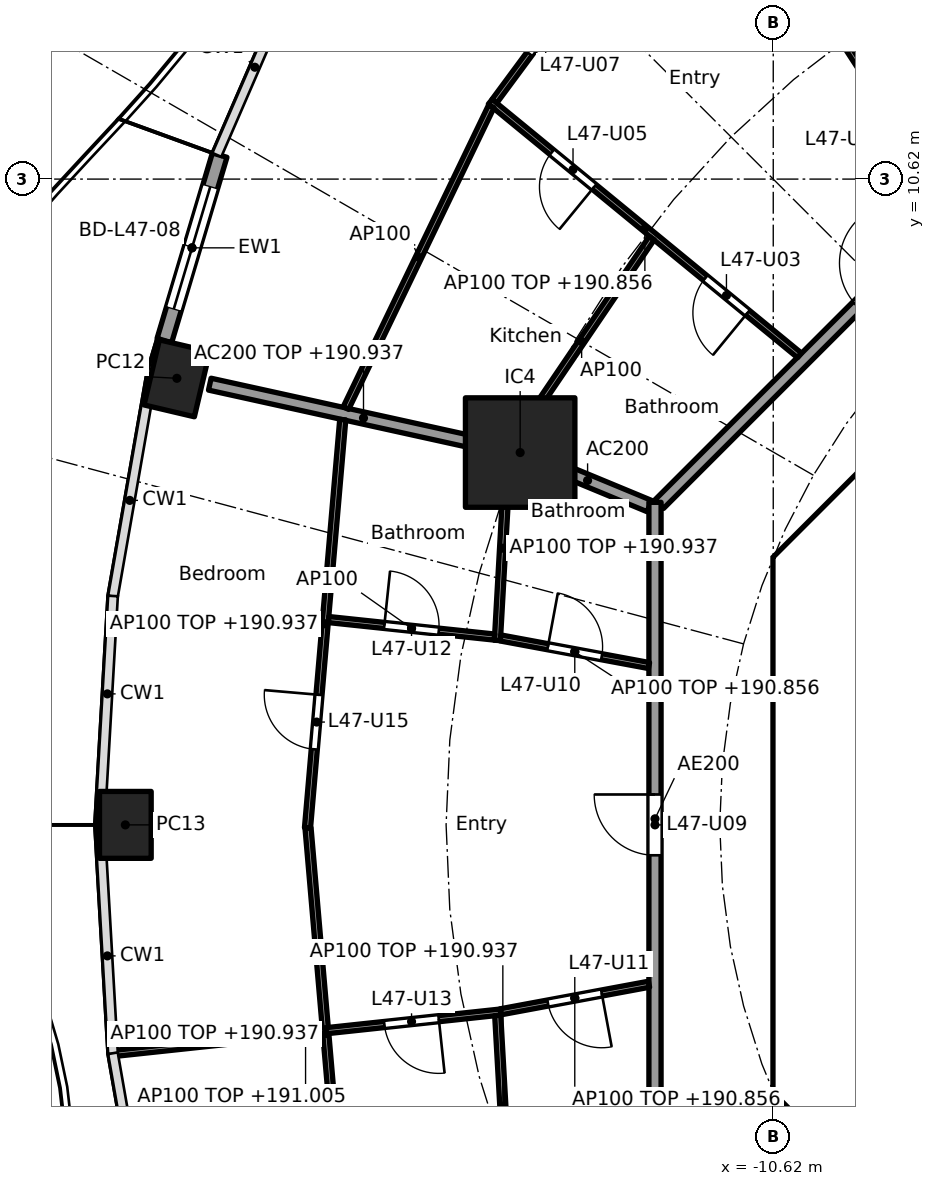
"""IFC4 building model, lengths in metres.
Left out: names, types, materials, properties, quantities, classifications, styles, units other than length and angle.
Written with IfcOpenShell. Run it as: python <this file> out.ifc"""

import sys

from ifc_helpers import new_model, si_unit, direction, frame, frame_2d, origin, origin_2d, place, context, subcontext, project, spatial, polyline, rectangle, hollow_rectangle, outline, extrude, element, fill, save


model = new_model("IFC4")
c1 = context("Model", 3, precision=1e-05, world=origin(), true_north=direction((0.0, 1.0)))
c2 = subcontext(c1, "Body", "Model", "MODEL_VIEW")
j1 = project(units=[si_unit("LENGTHUNIT", "METRE"), si_unit("PLANEANGLEUNIT", "RADIAN")], contexts=[c1])
p1 = place(None, origin())
s1 = spatial("IfcSite", under=j1, at=p1, CompositionType="ELEMENT")
p2 = place(p1, origin())
s2 = spatial("IfcBuilding", under=s1, at=p2, CompositionType="ELEMENT")
p3 = place(p2, frame((0.0, 0.0, 188.1)))
s3 = spatial("IfcBuildingStorey", under=s2, at=p3, CompositionType="ELEMENT", Elevation=188.1)
for number, where, z_axis, x_axis in (
    (1, (-20.427, 7.344, 0.0), (0.0, 0.0, 1.0), (-0.229, -0.973, 0.0)),
    (2, (-21.275, 0.0, 0.0), (0.0, 0.0, 1.0), (0.0, -1.0, 0.0)),
):
    element("IfcColumn", number, at=place(p3, frame(where, z_axis=z_axis, x_axis=x_axis)), inside=s3, PredefinedType="COLUMN", context=c2, shape_type="SweptSolid", body=[
        extrude(hollow_rectangle(XDim=1.1, YDim=0.85, WallThickness=0.036, at=origin_2d()), origin(), (0.0, 0.0, 1.0), 3.7),
    ])
p4 = place(p3, frame((-14.782, 6.123, 0.0), z_axis=(0.0, 0.0, 1.0), x_axis=(1.0, 0.0, 0.0)))
e3 = element("IfcColumn", 3, at=p4, inside=s3, PredefinedType="COLUMN", context=c2, shape_type="SweptSolid", body=[
    extrude(rectangle(XDim=1.8, YDim=1.8, at=origin_2d()), origin(), (0.0, 0.0, 1.0), 3.7),
])
p5 = place(p3, frame((-20.633, 7.965, 0.0), z_axis=(0.0, 0.0, 1.0), x_axis=(0.28584838049, 0.958274857946, 0.0)))
e4 = element("IfcWall", 4, at=p5, inside=s3, PredefinedType="SOLIDWALL", context=c2, shape_type="SweptSolid", body=[
    extrude(rectangle(XDim=3.182, YDim=0.25, at=frame_2d((1.591, 0.0))), origin(), (0.0, 0.0, 1.0), 3.44),
])
p6 = place(p5, frame((0.541, 0.0, 0.0)))
e5 = element("IfcOpeningElement", 5, at=p6, cuts=e4, PredefinedType="OPENING", context=c2, shape_type="SweptSolid", body=[
    extrude(rectangle(XDim=2.1, YDim=2.4, at=frame_2d((1.05, 1.2))), frame((0.0, 0.135, 0.0), z_axis=(0.0, -1.0, 0.0), x_axis=(1.0, 0.0, 0.0)), (0.0, 0.0, 1.0), 0.27),
])
p7 = place(p3, frame((-4.613, 9.988, 0.0), z_axis=(0.0, 0.0, 1.0), x_axis=(-0.707106781187, -0.707106781187, 0.0)))
e6 = element("IfcWall", 6, at=p7, inside=s3, PredefinedType="SHEAR", context=c2, shape_type="SweptSolid", body=[
    extrude(rectangle(XDim=7.602, YDim=0.6, at=frame_2d((3.801, 0.0))), origin(), (0.0, 0.0, 1.0), 3.44),
])
p8 = place(p7, frame((0.351, 0.0, 0.0)))
e7 = element("IfcOpeningElement", 7, at=p8, cuts=e6, PredefinedType="OPENING", context=c2, shape_type="SweptSolid", body=[
    extrude(rectangle(XDim=1.1, YDim=2.1, at=frame_2d((0.55, 1.05))), frame((0.0, 0.31, 0.0), z_axis=(0.0, -1.0, 0.0), x_axis=(1.0, 0.0, 0.0)), (0.0, 0.0, 1.0), 0.62),
])
p9 = place(p3, frame((-10.325, 3.801, 0.0), z_axis=(0.0, 0.0, 1.0), x_axis=(0.0, -1.0, 0.0)))
e8 = element("IfcWall", 8, at=p9, inside=s3, PredefinedType="SHEAR", context=c2, shape_type="SweptSolid", body=[
    extrude(rectangle(XDim=7.602, YDim=0.6, at=frame_2d((3.801, 0.0))), origin(), (0.0, 0.0, 1.0), 3.44),
])
p10 = place(p9, frame((0.651, 0.0, 0.0)))
e9 = element("IfcOpeningElement", 9, at=p10, cuts=e8, PredefinedType="OPENING", context=c2, shape_type="SweptSolid", body=[
    extrude(rectangle(XDim=1.5, YDim=2.1, at=frame_2d((0.75, 1.05))), frame((0.0, 0.31, 0.0), z_axis=(0.0, -1.0, 0.0), x_axis=(1.0, 0.0, 0.0)), (0.0, 0.0, 1.0), 0.62),
])
p11 = place(p9, frame((5.451, 0.0, 0.0)))
e10 = element("IfcOpeningElement", 10, at=p11, cuts=e8, PredefinedType="OPENING", context=c2, shape_type="SweptSolid", body=[
    extrude(rectangle(XDim=1.5, YDim=2.1, at=frame_2d((0.75, 1.05))), frame((0.0, 0.31, 0.0), z_axis=(0.0, -1.0, 0.0), x_axis=(1.0, 0.0, 0.0)), (0.0, 0.0, 1.0), 0.62),
])
p12 = place(p3, frame((-9.988, -4.613, 0.0), z_axis=(0.0, 0.0, 1.0), x_axis=(0.707106781187, -0.707106781187, 0.0)))
e11 = element("IfcWall", 11, at=p12, inside=s3, PredefinedType="SHEAR", context=c2, shape_type="SweptSolid", body=[
    extrude(rectangle(XDim=7.602, YDim=0.6, at=frame_2d((3.801, 0.0))), origin(), (0.0, 0.0, 1.0), 3.44),
])
p13 = place(p12, frame((6.151, 0.0, 0.0)))
e12 = element("IfcOpeningElement", 12, at=p13, cuts=e11, PredefinedType="OPENING", context=c2, shape_type="SweptSolid", body=[
    extrude(rectangle(XDim=1.1, YDim=2.1, at=frame_2d((0.55, 1.05))), frame((0.0, 0.31, 0.0), z_axis=(0.0, -1.0, 0.0), x_axis=(1.0, 0.0, 0.0)), (0.0, 0.0, 1.0), 0.62),
])
p14 = place(p3, origin())
e13 = element("IfcWall", 13, at=p14, inside=s3, PredefinedType="SHEAR", context=c2, shape_type="SweptSolid", body=[
    extrude(outline(polyline([(-10.625, -3.801), (-10.025, -3.801), (-10.025, -4.152), (-9.776, -4.401), (-10.2, -4.825), (-10.625, -4.401), (-10.625, -3.801)])), origin(), (0.0, 0.0, 1.0), 3.44),
])
p15 = place(p3, origin())
e14 = element("IfcWall", 14, at=p15, inside=s3, PredefinedType="SHEAR", context=c2, shape_type="SweptSolid", body=[
    extrude(outline(polyline([(-10.2, 4.825), (-9.776, 4.401), (-10.025, 4.152), (-10.025, 3.801), (-10.625, 3.801), (-10.625, 4.401), (-10.2, 4.825)])), origin(), (0.0, 0.0, 1.0), 3.44),
])
for number, where, z_axis, x_axis in (
    (15, (-10.025, -4.0, 0.0), (0.0, 0.0, 1.0), (1.0, 0.0, 0.0)),
    (16, (-10.025, 4.0, 0.0), (0.0, 0.0, 1.0), (1.0, 0.0, 0.0)),
):
    element("IfcWall", number, at=place(p3, frame(where, z_axis=z_axis, x_axis=x_axis)), inside=s3, PredefinedType="PARTITIONING", context=c2, shape_type="SweptSolid", body=[
        extrude(rectangle(XDim=3.325, YDim=0.2, at=frame_2d((1.662, 0.0))), origin(), (0.0, 0.0, 1.0), 3.44),
    ])
p16 = place(p3, frame((-12.657, 5.243, 0.0), z_axis=(0.0, 0.0, 1.0), x_axis=(-0.923859888513, 0.38273085373, 0.0)))
e17 = element("IfcWall", 17, at=p16, inside=s3, PredefinedType="PARTITIONING", context=c2, shape_type="SweptSolid", body=[
    extrude(rectangle(XDim=2.199, YDim=0.2, at=frame_2d((1.1, 0.0))), origin(), (0.0, 0.0, 1.0), 3.44),
])
p17 = place(p3, frame((-14.831, 6.134, 0.0), z_axis=(0.0, 0.0, 1.0), x_axis=(-0.976568396888, 0.215207263354, 0.0)))
e18 = element("IfcWall", 18, at=p17, inside=s3, PredefinedType="PARTITIONING", context=c2, shape_type="SweptSolid", body=[
    extrude(rectangle(XDim=5.177, YDim=0.2, at=frame_2d((2.588, 0.0))), origin(), (0.0, 0.0, 1.0), 2.837),
])
p18 = place(p3, frame((-5.275, 12.494, 0.0), z_axis=(0.0, 0.0, 1.0), x_axis=(-0.707106781187, -0.707106781187, 0.0)))
e19 = element("IfcWall", 19, at=p18, inside=s3, PredefinedType="PARTITIONING", context=c2, shape_type="SweptSolid", body=[
    extrude(rectangle(XDim=10.209, YDim=0.2, at=frame_2d((5.104, 0.0))), origin(), (0.0, 0.0, 1.0), 3.44),
])
p19 = place(p18, frame((4.604, 0.0, 0.0)))
e20 = element("IfcOpeningElement", 20, at=p19, cuts=e19, PredefinedType="OPENING", context=c2, shape_type="SweptSolid", body=[
    extrude(rectangle(XDim=1.0, YDim=2.1, at=frame_2d((0.5, 1.05))), frame((0.0, 0.11, 0.0), z_axis=(0.0, -1.0, 0.0), x_axis=(1.0, 0.0, 0.0)), (0.0, 0.0, 1.0), 0.22),
])
p20 = place(p3, frame((-12.565, 5.304, 0.0), z_axis=(0.0, 0.0, 1.0), x_axis=(0.0, -1.0, 0.0)))
e21 = element("IfcWall", 21, at=p20, inside=s3, PredefinedType="PARTITIONING", context=c2, shape_type="SweptSolid", body=[
    extrude(rectangle(XDim=10.409, YDim=0.2, at=frame_2d((5.205, 0.0))), origin(), (0.0, 0.0, 1.0), 3.44),
])
p21 = place(p20, frame((4.804, 0.0, 0.0)))
e22 = element("IfcOpeningElement", 22, at=p21, cuts=e21, PredefinedType="OPENING", context=c2, shape_type="SweptSolid", body=[
    extrude(rectangle(XDim=1.0, YDim=2.1, at=frame_2d((0.5, 1.05))), frame((0.0, 0.11, 0.0), z_axis=(0.0, -1.0, 0.0), x_axis=(1.0, 0.0, 0.0)), (0.0, 0.0, 1.0), 0.22),
])
p22 = place(p3, frame((-7.712, 10.195, 0.0), z_axis=(0.0, 0.0, 1.0), x_axis=(-0.544179442551, 0.838968851809, 0.0)))
e23 = element("IfcWall", 23, at=p22, inside=s3, PredefinedType="PARTITIONING", context=c2, shape_type="SweptSolid", body=[
    extrude(rectangle(XDim=7.566, YDim=0.1, at=frame_2d((3.783, 0.0))), origin(), (0.0, 0.0, 1.0), 2.756),
])
p23 = place(p22, frame((1.343, 0.0, 0.0)))
e24 = element("IfcOpeningElement", 24, at=p23, cuts=e23, PredefinedType="OPENING", context=c2, shape_type="SweptSolid", body=[
    extrude(rectangle(XDim=0.9, YDim=2.1, at=frame_2d((0.45, 1.05))), frame((0.0, 0.06, 0.0), z_axis=(0.0, -1.0, 0.0), x_axis=(1.0, 0.0, 0.0)), (0.0, 0.0, 1.0), 0.12),
])
p24 = place(p22, frame((5.101, 0.0, 0.0)))
e25 = element("IfcOpeningElement", 25, at=p24, cuts=e23, PredefinedType="OPENING", context=c2, shape_type="SweptSolid", body=[
    extrude(rectangle(XDim=0.9, YDim=2.1, at=frame_2d((0.45, 1.05))), frame((0.0, 0.06, 0.0), z_axis=(0.0, -1.0, 0.0), x_axis=(1.0, 0.0, 0.0)), (0.0, 0.0, 1.0), 0.12),
])
p25 = place(p3, frame((-11.832, 16.461, 0.0), z_axis=(0.0, 0.0, 1.0), x_axis=(-0.594704483906, -0.803944386647, 0.0)))
e26 = element("IfcWall", 26, at=p25, inside=s3, PredefinedType="PARTITIONING", context=c2, shape_type="SweptSolid", body=[
    extrude(rectangle(XDim=5.672, YDim=0.1, at=frame_2d((2.836, 0.0))), origin(), (0.0, 0.0, 1.0), 2.837),
])
p26 = place(p25, frame((0.968, 0.0, 0.0)))
e27 = element("IfcOpeningElement", 27, at=p26, cuts=e26, PredefinedType="OPENING", context=c2, shape_type="SweptSolid", body=[
    extrude(rectangle(XDim=0.9, YDim=2.1, at=frame_2d((0.45, 1.05))), frame((0.0, 0.06, 0.0), z_axis=(0.0, -1.0, 0.0), x_axis=(1.0, 0.0, 0.0)), (0.0, 0.0, 1.0), 0.12),
])
p27 = place(p25, frame((3.804, 0.0, 0.0)))
e28 = element("IfcOpeningElement", 28, at=p27, cuts=e26, PredefinedType="OPENING", context=c2, shape_type="SweptSolid", body=[
    extrude(rectangle(XDim=0.9, YDim=2.1, at=frame_2d((0.45, 1.05))), frame((0.0, 0.06, 0.0), z_axis=(0.0, -1.0, 0.0), x_axis=(1.0, 0.0, 0.0)), (0.0, 0.0, 1.0), 0.12),
])
p28 = place(p3, frame((-10.189, 7.721, 0.0), z_axis=(0.0, 0.0, 1.0), x_axis=(-0.773121441079, 0.634258021112, 0.0)))
e29 = element("IfcWall", 29, at=p28, inside=s3, PredefinedType="PARTITIONING", context=c2, shape_type="SweptSolid", body=[
    extrude(rectangle(XDim=6.577, YDim=0.1, at=frame_2d((3.289, 0.0))), origin(), (0.0, 0.0, 1.0), 2.756),
])
p29 = place(p28, frame((1.104, 0.0, 0.0)))
e30 = element("IfcOpeningElement", 30, at=p29, cuts=e29, PredefinedType="OPENING", context=c2, shape_type="SweptSolid", body=[
    extrude(rectangle(XDim=0.9, YDim=2.1, at=frame_2d((0.45, 1.05))), frame((0.0, 0.06, 0.0), z_axis=(0.0, -1.0, 0.0), x_axis=(1.0, 0.0, 0.0)), (0.0, 0.0, 1.0), 0.12),
])
p30 = place(p28, frame((4.367, 0.0, 0.0)))
e31 = element("IfcOpeningElement", 31, at=p30, cuts=e29, PredefinedType="OPENING", context=c2, shape_type="SweptSolid", body=[
    extrude(rectangle(XDim=0.9, YDim=2.1, at=frame_2d((0.45, 1.05))), frame((0.0, 0.06, 0.0), z_axis=(0.0, -1.0, 0.0), x_axis=(1.0, 0.0, 0.0)), (0.0, 0.0, 1.0), 0.12),
])
p31 = place(p3, frame((-12.619, 9.65, 0.0), z_axis=(0.0, 0.0, 1.0), x_axis=(-0.561046521684, -0.82778427172, 0.0)))
e32 = element("IfcWall", 32, at=p31, inside=s3, PredefinedType="PARTITIONING", context=c2, shape_type="SweptSolid", body=[
    extrude(rectangle(XDim=4.109, YDim=0.1, at=frame_2d((2.054, 0.0))), origin(), (0.0, 0.0, 1.0), 3.44),
])
p32 = place(p3, frame((-15.257, 11.816, 0.0), z_axis=(0.0, 0.0, 1.0), x_axis=(-0.434027506504, -0.900899619046, 0.0)))
e33 = element("IfcWall", 33, at=p32, inside=s3, PredefinedType="PARTITIONING", context=c2, shape_type="SweptSolid", body=[
    extrude(rectangle(XDim=5.508, YDim=0.1, at=frame_2d((2.754, 0.0))), origin(), (0.0, 0.0, 1.0), 3.44),
])
p33 = place(p3, frame((-14.986, 6.067, 0.0), z_axis=(0.0, 0.0, 1.0), x_axis=(-0.056333452925, -0.998412010185, 0.0)))
e34 = element("IfcWall", 34, at=p33, inside=s3, PredefinedType="PARTITIONING", context=c2, shape_type="SweptSolid", body=[
    extrude(rectangle(XDim=3.038, YDim=0.1, at=frame_2d((1.519, 0.0))), origin(), (0.0, 0.0, 1.0), 2.837),
])
p34 = place(p3, frame((-17.7, 6.664, 0.0), z_axis=(0.0, 0.0, 1.0), x_axis=(-0.086004282666, -0.996294767307, 0.0)))
e35 = element("IfcWall", 35, at=p34, inside=s3, PredefinedType="PARTITIONING", context=c2, shape_type="SweptSolid", body=[
    extrude(rectangle(XDim=6.739, YDim=0.1, at=frame_2d((3.37, 0.0))), origin(), (0.0, 0.0, 1.0), 2.837),
])
p35 = place(p34, frame((4.542, 0.0, 0.0)))
e36 = element("IfcOpeningElement", 36, at=p35, cuts=e35, PredefinedType="OPENING", context=c2, shape_type="SweptSolid", body=[
    extrude(rectangle(XDim=0.9, YDim=2.1, at=frame_2d((0.45, 1.05))), frame((0.0, 0.06, 0.0), z_axis=(0.0, -1.0, 0.0), x_axis=(1.0, 0.0, 0.0)), (0.0, 0.0, 1.0), 0.12),
])
p36 = place(p3, frame((-12.663, 2.621, 0.0), z_axis=(0.0, 0.0, 1.0), x_axis=(-0.983176884312, 0.182655999505, 0.0)))
e37 = element("IfcWall", 37, at=p36, inside=s3, PredefinedType="PARTITIONING", context=c2, shape_type="SweptSolid", body=[
    extrude(rectangle(XDim=2.483, YDim=0.1, at=frame_2d((1.242, 0.0))), origin(), (0.0, 0.0, 1.0), 2.756),
])
p37 = place(p36, frame((0.792, 0.0, 0.0)))
e38 = element("IfcOpeningElement", 38, at=p37, cuts=e37, PredefinedType="OPENING", context=c2, shape_type="SweptSolid", body=[
    extrude(rectangle(XDim=0.9, YDim=2.1, at=frame_2d((0.45, 1.05))), frame((0.0, 0.06, 0.0), z_axis=(0.0, -1.0, 0.0), x_axis=(1.0, 0.0, 0.0)), (0.0, 0.0, 1.0), 0.12),
])
p38 = place(p3, frame((-15.204, 3.089, 0.0), z_axis=(0.0, 0.0, 1.0), x_axis=(-0.994477149695, 0.104953316934, 0.0)))
e39 = element("IfcWall", 39, at=p38, inside=s3, PredefinedType="PARTITIONING", context=c2, shape_type="SweptSolid", body=[
    extrude(rectangle(XDim=2.745, YDim=0.1, at=frame_2d((1.373, 0.0))), origin(), (0.0, 0.0, 1.0), 3.44),
])
p39 = place(p38, frame((0.922, 0.0, 0.0)))
e40 = element("IfcOpeningElement", 40, at=p39, cuts=e39, PredefinedType="OPENING", context=c2, shape_type="SweptSolid", body=[
    extrude(rectangle(XDim=0.9, YDim=2.1, at=frame_2d((0.45, 1.05))), frame((0.0, 0.06, 0.0), z_axis=(0.0, -1.0, 0.0), x_axis=(1.0, 0.0, 0.0)), (0.0, 0.0, 1.0), 0.12),
])
p40 = place(p3, frame((-18.271, -0.05, 0.0), z_axis=(0.0, 0.0, 1.0), x_axis=(0.086018199227, -0.996293565874, 0.0)))
e41 = element("IfcWall", 41, at=p40, inside=s3, PredefinedType="PARTITIONING", context=c2, shape_type="SweptSolid", body=[
    extrude(rectangle(XDim=6.789, YDim=0.1, at=frame_2d((3.395, 0.0))), origin(), (0.0, 0.0, 1.0), 2.837),
])
p41 = place(p3, frame((-12.663, -2.621, 0.0), z_axis=(0.0, 0.0, 1.0), x_axis=(-0.983176884312, -0.182655999505, 0.0)))
e42 = element("IfcWall", 42, at=p41, inside=s3, PredefinedType="PARTITIONING", context=c2, shape_type="SweptSolid", body=[
    extrude(rectangle(XDim=2.483, YDim=0.1, at=frame_2d((1.242, 0.0))), origin(), (0.0, 0.0, 1.0), 2.756),
])
p42 = place(p41, frame((0.792, 0.0, 0.0)))
e43 = element("IfcOpeningElement", 43, at=p42, cuts=e42, PredefinedType="OPENING", context=c2, shape_type="SweptSolid", body=[
    extrude(rectangle(XDim=0.9, YDim=2.1, at=frame_2d((0.45, 1.05))), frame((0.0, 0.06, 0.0), z_axis=(0.0, -1.0, 0.0), x_axis=(1.0, 0.0, 0.0)), (0.0, 0.0, 1.0), 0.12),
])
p43 = place(p3, frame((-15.104, -3.078, 0.0), z_axis=(0.0, 0.0, 1.0), x_axis=(-0.994316167803, -0.106467640365, 0.0)))
e44 = element("IfcWall", 44, at=p43, inside=s3, PredefinedType="PARTITIONING", context=c2, shape_type="SweptSolid", body=[
    extrude(rectangle(XDim=6.45, YDim=0.1, at=frame_2d((3.225, 0.0))), origin(), (0.0, 0.0, 1.0), 2.905),
])
p44 = place(p43, frame((1.022, 0.0, 0.0)))
e45 = element("IfcOpeningElement", 45, at=p44, cuts=e44, PredefinedType="OPENING", context=c2, shape_type="SweptSolid", body=[
    extrude(rectangle(XDim=0.9, YDim=2.1, at=frame_2d((0.45, 1.05))), frame((0.0, 0.06, 0.0), z_axis=(0.0, -1.0, 0.0), x_axis=(1.0, 0.0, 0.0)), (0.0, 0.0, 1.0), 0.12),
])
p45 = place(p3, frame((-15.151, -3.133, 0.0), z_axis=(0.0, 0.0, 1.0), x_axis=(0.05637501378, -0.998409664327, 0.0)))
e46 = element("IfcWall", 46, at=p45, inside=s3, PredefinedType="PARTITIONING", context=c2, shape_type="SweptSolid", body=[
    extrude(rectangle(XDim=2.988, YDim=0.1, at=frame_2d((1.494, 0.0))), origin(), (0.0, 0.0, 1.0), 2.837),
])
p46 = place(p6, origin())
e47 = element("IfcDoor", 47, at=p46, inside=s3, OperationType="SLIDING_TO_LEFT", PredefinedType="DOOR", context=c2, shape_type="SweptSolid", body=[
    extrude(rectangle(XDim=2.1, YDim=2.4, at=frame_2d((1.05, 1.2))), frame((0.0, 0.025, 0.0), z_axis=(0.0, -1.0, 0.0), x_axis=(1.0, 0.0, 0.0)), (0.0, 0.0, 1.0), 0.05),
])
fill(e5, e47)
p47 = place(p10, origin())
e48 = element("IfcDoor", 48, at=p47, inside=s3, OperationType="DOUBLE_DOOR_SINGLE_SWING", PredefinedType="DOOR", context=c2, shape_type="SweptSolid", body=[
    extrude(rectangle(XDim=1.5, YDim=2.1, at=frame_2d((0.75, 1.05))), frame((0.0, 0.025, 0.0), z_axis=(0.0, -1.0, 0.0), x_axis=(1.0, 0.0, 0.0)), (0.0, 0.0, 1.0), 0.05),
])
fill(e9, e48)
p48 = place(p11, origin())
e49 = element("IfcDoor", 49, at=p48, inside=s3, OperationType="DOUBLE_DOOR_SINGLE_SWING", PredefinedType="DOOR", context=c2, shape_type="SweptSolid", body=[
    extrude(rectangle(XDim=1.5, YDim=2.1, at=frame_2d((0.75, 1.05))), frame((0.0, 0.025, 0.0), z_axis=(0.0, -1.0, 0.0), x_axis=(1.0, 0.0, 0.0)), (0.0, 0.0, 1.0), 0.05),
])
fill(e10, e49)
p49 = place(p29, origin())
e50 = element("IfcDoor", 50, at=p49, inside=s3, OperationType="SINGLE_SWING_LEFT", PredefinedType="DOOR", context=c2, shape_type="SweptSolid", body=[
    extrude(rectangle(XDim=0.9, YDim=2.1, at=frame_2d((0.45, 1.05))), frame((0.0, 0.025, 0.0), z_axis=(0.0, -1.0, 0.0), x_axis=(1.0, 0.0, 0.0)), (0.0, 0.0, 1.0), 0.05),
])
fill(e30, e50)
p50 = place(p30, origin())
e51 = element("IfcDoor", 51, at=p50, inside=s3, OperationType="SINGLE_SWING_LEFT", PredefinedType="DOOR", context=c2, shape_type="SweptSolid", body=[
    extrude(rectangle(XDim=0.9, YDim=2.1, at=frame_2d((0.45, 1.05))), frame((0.0, 0.025, 0.0), z_axis=(0.0, -1.0, 0.0), x_axis=(1.0, 0.0, 0.0)), (0.0, 0.0, 1.0), 0.05),
])
fill(e31, e51)
p51 = place(p27, frame((0.9, 0.0, 0.0), x_axis=(-1.0, 0.0, 0.0)))
e52 = element("IfcDoor", 52, at=p51, inside=s3, OperationType="SINGLE_SWING_RIGHT", PredefinedType="DOOR", context=c2, shape_type="SweptSolid", body=[
    extrude(rectangle(XDim=0.9, YDim=2.1, at=frame_2d((0.45, 1.05))), frame((0.0, 0.025, 0.0), z_axis=(0.0, -1.0, 0.0), x_axis=(1.0, 0.0, 0.0)), (0.0, 0.0, 1.0), 0.05),
])
fill(e28, e52)
p52 = place(p21, frame((1.0, 0.0, 0.0), x_axis=(-1.0, 0.0, 0.0)))
e53 = element("IfcDoor", 53, at=p52, inside=s3, OperationType="SINGLE_SWING_RIGHT", PredefinedType="DOOR", context=c2, shape_type="SweptSolid", body=[
    extrude(rectangle(XDim=1.0, YDim=2.1, at=frame_2d((0.5, 1.05))), frame((0.0, 0.025, 0.0), z_axis=(0.0, -1.0, 0.0), x_axis=(1.0, 0.0, 0.0)), (0.0, 0.0, 1.0), 0.05),
])
fill(e22, e53)
p53 = place(p37, frame((0.9, 0.0, 0.0), x_axis=(-1.0, 0.0, 0.0)))
e54 = element("IfcDoor", 54, at=p53, inside=s3, OperationType="SINGLE_SWING_LEFT", PredefinedType="DOOR", context=c2, shape_type="SweptSolid", body=[
    extrude(rectangle(XDim=0.9, YDim=2.1, at=frame_2d((0.45, 1.05))), frame((0.0, 0.025, 0.0), z_axis=(0.0, -1.0, 0.0), x_axis=(1.0, 0.0, 0.0)), (0.0, 0.0, 1.0), 0.05),
])
fill(e38, e54)
p54 = place(p42, origin())
e55 = element("IfcDoor", 55, at=p54, inside=s3, OperationType="SINGLE_SWING_LEFT", PredefinedType="DOOR", context=c2, shape_type="SweptSolid", body=[
    extrude(rectangle(XDim=0.9, YDim=2.1, at=frame_2d((0.45, 1.05))), frame((0.0, 0.025, 0.0), z_axis=(0.0, -1.0, 0.0), x_axis=(1.0, 0.0, 0.0)), (0.0, 0.0, 1.0), 0.05),
])
fill(e43, e55)
p55 = place(p39, frame((0.9, 0.0, 0.0), x_axis=(-1.0, 0.0, 0.0)))
e56 = element("IfcDoor", 56, at=p55, inside=s3, OperationType="SINGLE_SWING_LEFT", PredefinedType="DOOR", context=c2, shape_type="SweptSolid", body=[
    extrude(rectangle(XDim=0.9, YDim=2.1, at=frame_2d((0.45, 1.05))), frame((0.0, 0.025, 0.0), z_axis=(0.0, -1.0, 0.0), x_axis=(1.0, 0.0, 0.0)), (0.0, 0.0, 1.0), 0.05),
])
fill(e40, e56)
p56 = place(p44, origin())
e57 = element("IfcDoor", 57, at=p56, inside=s3, OperationType="SINGLE_SWING_LEFT", PredefinedType="DOOR", context=c2, shape_type="SweptSolid", body=[
    extrude(rectangle(XDim=0.9, YDim=2.1, at=frame_2d((0.45, 1.05))), frame((0.0, 0.025, 0.0), z_axis=(0.0, -1.0, 0.0), x_axis=(1.0, 0.0, 0.0)), (0.0, 0.0, 1.0), 0.05),
])
fill(e45, e57)
p57 = place(p35, frame((0.9, 0.0, 0.0), x_axis=(-1.0, 0.0, 0.0)))
e58 = element("IfcDoor", 58, at=p57, inside=s3, OperationType="SINGLE_SWING_RIGHT", PredefinedType="DOOR", context=c2, shape_type="SweptSolid", body=[
    extrude(rectangle(XDim=0.9, YDim=2.1, at=frame_2d((0.45, 1.05))), frame((0.0, 0.025, 0.0), z_axis=(0.0, -1.0, 0.0), x_axis=(1.0, 0.0, 0.0)), (0.0, 0.0, 1.0), 0.05),
])
fill(e36, e58)
save(model, sys.argv[1])
